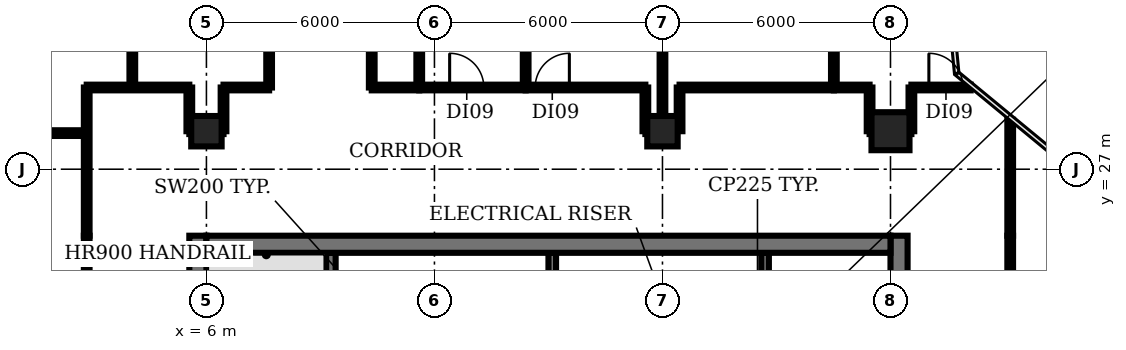
"""IFC4 building model, lengths in metres.
Left out: names, types, materials, properties, quantities, classifications, styles, units other than length and angle.
Written with IfcOpenShell. Run it as: python <this file> out.ifc"""

import sys

from ifc_helpers import new_model, si_unit, direction, frame, frame_2d, origin, origin_2d, place, context, subcontext, project, spatial, rectangle, circle, extrude, element, fill, save


model = new_model("IFC4")
c1 = context("Model", 3, precision=1e-05, world=origin(), true_north=direction((0.0, 1.0)))
c2 = subcontext(c1, "Body", "Model", "MODEL_VIEW")
j1 = project(units=[si_unit("LENGTHUNIT", "METRE"), si_unit("PLANEANGLEUNIT", "RADIAN")], contexts=[c1])
p1 = place(None, origin())
s1 = spatial("IfcSite", under=j1, at=p1, CompositionType="ELEMENT")
p2 = place(p1, origin())
s2 = spatial("IfcBuilding", under=s1, at=p2, CompositionType="ELEMENT")
p3 = place(p2, frame((0.0, 0.0, 205.4)))
s3 = spatial("IfcBuildingStorey", under=s2, at=p3, CompositionType="ELEMENT", Elevation=205.4)
for number, where, z_axis, x_axis in (
    (1, (6.0, 28.0, -0.35), (0.0, 0.0, 1.0), (1.0, 0.0, 0.0)),
    (2, (18.0, 28.0, -0.35), (0.0, 0.0, 1.0), (1.0, 0.0, 0.0)),
):
    element("IfcColumn", number, at=place(p3, frame(where, z_axis=z_axis, x_axis=x_axis)), inside=s3, PredefinedType="COLUMN", context=c2, shape_type="SweptSolid", body=[
        extrude(rectangle(XDim=0.8, YDim=0.8, at=origin_2d()), origin(), (0.0, 0.0, 1.0), 4.2),
    ])
p4 = place(p3, frame((24.0, 28.0, -0.35), z_axis=(0.0, 0.0, 1.0), x_axis=(1.0, 0.0, 0.0)))
e3 = element("IfcColumn", 3, at=p4, inside=s3, PredefinedType="COLUMN", context=c2, shape_type="SweptSolid", body=[
    extrude(circle(Radius=0.5, at=origin_2d()), origin(), (0.0, 0.0, 1.0), 4.2),
])
p5 = place(p3, frame((9.275, 18.375, 0.0), z_axis=(0.0, 0.0, 1.0), x_axis=(0.0, 1.0, 0.0)))
e4 = element("IfcWall", 4, at=p5, inside=s3, PredefinedType="SHEAR", context=c2, shape_type="SweptSolid", body=[
    extrude(rectangle(XDim=6.425, YDim=0.25, at=frame_2d((3.212, 0.0))), origin(), (0.0, 0.0, 1.0), 3.85),
])
for number, where, z_axis, x_axis in (
    (5, (15.1, 22.9, 0.0), (0.0, 0.0, 1.0), (0.0, 1.0, 0.0)),
    (6, (20.7, 22.9, 0.0), (0.0, 0.0, 1.0), (0.0, 1.0, 0.0)),
):
    element("IfcWall", number, at=place(p3, frame(where, z_axis=z_axis, x_axis=x_axis)), inside=s3, PredefinedType="SHEAR", context=c2, shape_type="SweptSolid", body=[
        extrude(rectangle(XDim=1.9, YDim=0.2, at=frame_2d((0.95, 0.0))), origin(), (0.0, 0.0, 1.0), 3.85),
    ])
p6 = place(p3, frame((5.775, 4.47, 0.0), z_axis=(0.0, 0.0, 1.0), x_axis=(0.0, 1.0, 0.0)))
e7 = element("IfcWall", 7, at=p6, inside=s3, PredefinedType="SHEAR", context=c2, shape_type="SweptSolid", body=[
    extrude(rectangle(XDim=20.78, YDim=0.45, at=frame_2d((10.39, 0.0))), origin(), (0.0, 0.0, 1.0), 3.85),
])
p7 = place(p6, frame((1.18, 0.0, 0.0)))
e8 = element("IfcOpeningElement", 8, at=p7, cuts=e7, PredefinedType="OPENING", context=c2, shape_type="SweptSolid", body=[
    extrude(rectangle(XDim=1.5, YDim=2.1, at=frame_2d((0.75, 1.05))), frame((0.0, 0.235, 0.0), z_axis=(0.0, -1.0, 0.0), x_axis=(1.0, 0.0, 0.0)), (0.0, 0.0, 1.0), 0.47),
])
p8 = place(p6, frame((7.63, 0.0, 0.0)))
e9 = element("IfcOpeningElement", 9, at=p8, cuts=e7, PredefinedType="OPENING", context=c2, shape_type="SweptSolid", body=[
    extrude(rectangle(XDim=1.2, YDim=2.1, at=frame_2d((0.6, 1.05))), frame((0.0, 0.235, 0.0), z_axis=(0.0, -1.0, 0.0), x_axis=(1.0, 0.0, 0.0)), (0.0, 0.0, 1.0), 0.47),
])
p9 = place(p6, frame((14.18, 0.0, 0.0)))
e10 = element("IfcOpeningElement", 10, at=p9, cuts=e7, PredefinedType="OPENING", context=c2, shape_type="SweptSolid", body=[
    extrude(rectangle(XDim=1.2, YDim=2.1, at=frame_2d((0.6, 1.05))), frame((0.0, 0.235, 0.0), z_axis=(0.0, -1.0, 0.0), x_axis=(1.0, 0.0, 0.0)), (0.0, 0.0, 1.0), 0.47),
])
p10 = place(p3, frame((24.225, 25.25, 0.0), z_axis=(0.0, 0.0, 1.0), x_axis=(0.0, -1.0, 0.0)))
e11 = element("IfcWall", 11, at=p10, inside=s3, PredefinedType="SHEAR", context=c2, shape_type="SweptSolid", body=[
    extrude(rectangle(XDim=20.78, YDim=0.45, at=frame_2d((10.39, 0.0))), origin(), (0.0, 0.0, 1.0), 3.85),
])
p11 = place(p10, frame((18.1, 0.0, 0.0)))
e12 = element("IfcOpeningElement", 12, at=p11, cuts=e11, PredefinedType="OPENING", context=c2, shape_type="SweptSolid", body=[
    extrude(rectangle(XDim=1.5, YDim=2.1, at=frame_2d((0.75, 1.05))), frame((0.0, 0.235, 0.0), z_axis=(0.0, -1.0, 0.0), x_axis=(1.0, 0.0, 0.0)), (0.0, 0.0, 1.0), 0.47),
])
p12 = place(p10, frame((12.0, 0.0, 0.0)))
e13 = element("IfcOpeningElement", 13, at=p12, cuts=e11, PredefinedType="OPENING", context=c2, shape_type="SweptSolid", body=[
    extrude(rectangle(XDim=0.9, YDim=2.1, at=frame_2d((0.45, 1.05))), frame((0.0, 0.235, 0.0), z_axis=(0.0, -1.0, 0.0), x_axis=(1.0, 0.0, 0.0)), (0.0, 0.0, 1.0), 0.47),
])
p13 = place(p10, frame((6.0, 0.0, 0.0)))
e14 = element("IfcOpeningElement", 14, at=p13, cuts=e11, PredefinedType="OPENING", context=c2, shape_type="SweptSolid", body=[
    extrude(rectangle(XDim=2.0, YDim=2.1, at=frame_2d((1.0, 1.05))), frame((0.0, 0.235, 0.0), z_axis=(0.0, -1.0, 0.0), x_axis=(1.0, 0.0, 0.0)), (0.0, 0.0, 1.0), 0.47),
])
p14 = place(p3, frame((6.0, 25.025, 0.0), z_axis=(0.0, 0.0, 1.0), x_axis=(1.0, 0.0, 0.0)))
e15 = element("IfcWall", 15, at=p14, inside=s3, PredefinedType="SHEAR", context=c2, shape_type="SweptSolid", body=[
    extrude(rectangle(XDim=18.0, YDim=0.45, at=frame_2d((9.0, 0.0))), origin(), (0.0, 0.0, 1.0), 3.85),
])
p15 = place(p3, frame((-0.98, 27.95, 0.0), z_axis=(0.0, 0.0, 1.0), x_axis=(1.0, 0.0, 0.0)))
e16 = element("IfcWall", 16, at=p15, inside=s3, PredefinedType="PARTITIONING", context=c2, shape_type="SweptSolid", body=[
    extrude(rectangle(XDim=3.83, YDim=0.15, at=frame_2d((1.915, 0.0))), origin(), (0.0, 0.0, 1.0), 2.88),
])
p16 = place(p3, frame((2.85, 5.77, 0.0), z_axis=(0.0, 0.0, 1.0), x_axis=(0.0, 1.0, 0.0)))
e17 = element("IfcWall", 17, at=p16, inside=s3, PredefinedType="PARTITIONING", context=c2, shape_type="SweptSolid", body=[
    extrude(rectangle(XDim=19.48, YDim=0.15, at=frame_2d((9.74, 0.0))), origin(), (0.0, 0.0, 1.0), 2.88),
])
p17 = place(p16, frame((8.48, 0.0, 0.0)))
e18 = element("IfcOpeningElement", 18, at=p17, cuts=e17, PredefinedType="OPENING", context=c2, shape_type="SweptSolid", body=[
    extrude(rectangle(XDim=1.2, YDim=2.1, at=frame_2d((0.6, 1.05))), frame((0.0, 0.085, 0.0), z_axis=(0.0, -1.0, 0.0), x_axis=(1.0, 0.0, 0.0)), (0.0, 0.0, 1.0), 0.17),
])
p18 = place(p3, frame((2.85, 25.25, 0.0), z_axis=(0.0, 0.0, 1.0), x_axis=(0.0, 1.0, 0.0)))
e19 = element("IfcWall", 19, at=p18, inside=s3, PredefinedType="PARTITIONING", context=c2, shape_type="SweptSolid", body=[
    extrude(rectangle(XDim=3.9, YDim=0.15, at=frame_2d((1.95, 0.0))), origin(), (0.0, 0.0, 1.0), 2.88),
])
p19 = place(p3, frame((2.85, 29.15, 0.0), z_axis=(0.0, 0.0, 1.0), x_axis=(1.0, 0.0, 0.0)))
e20 = element("IfcWall", 20, at=p19, inside=s3, PredefinedType="PARTITIONING", context=c2, shape_type="SweptSolid", body=[
    extrude(rectangle(XDim=2.7, YDim=0.15, at=frame_2d((1.35, 0.0))), origin(), (0.0, 0.0, 1.0), 2.88),
])
p20 = place(p3, frame((4.05, 29.15, 0.0), z_axis=(0.0, 0.0, 1.0), x_axis=(0.0, 1.0, 0.0)))
e21 = element("IfcWall", 21, at=p20, inside=s3, PredefinedType="PARTITIONING", context=c2, shape_type="SweptSolid", body=[
    extrude(rectangle(XDim=4.8, YDim=0.15, at=frame_2d((2.4, 0.0))), origin(), (0.0, 0.0, 1.0), 2.88),
])
p21 = place(p3, frame((5.55, 28.0, 0.0), z_axis=(0.0, 0.0, 1.0), x_axis=(0.0, 1.0, 0.0)))
e22 = element("IfcWall", 22, at=p21, inside=s3, PredefinedType="PARTITIONING", context=c2, shape_type="SweptSolid", body=[
    extrude(rectangle(XDim=1.15, YDim=0.15, at=frame_2d((0.575, 0.0))), origin(), (0.0, 0.0, 1.0), 2.88),
])
p22 = place(p3, frame((5.55, 28.0, 0.0), z_axis=(0.0, 0.0, 1.0), x_axis=(1.0, 0.0, 0.0)))
e23 = element("IfcWall", 23, at=p22, inside=s3, PredefinedType="PARTITIONING", context=c2, shape_type="SweptSolid", body=[
    extrude(rectangle(XDim=0.9, YDim=0.15, at=frame_2d((0.45, 0.0))), origin(), (0.0, 0.0, 1.0), 2.88),
])
p23 = place(p3, frame((6.45, 28.0, 0.0), z_axis=(0.0, 0.0, 1.0), x_axis=(0.0, 1.0, 0.0)))
e24 = element("IfcWall", 24, at=p23, inside=s3, PredefinedType="PARTITIONING", context=c2, shape_type="SweptSolid", body=[
    extrude(rectangle(XDim=1.15, YDim=0.15, at=frame_2d((0.575, 0.0))), origin(), (0.0, 0.0, 1.0), 2.88),
])
p24 = place(p3, frame((6.45, 29.15, 0.0), z_axis=(0.0, 0.0, 1.0), x_axis=(1.0, 0.0, 0.0)))
e25 = element("IfcWall", 25, at=p24, inside=s3, PredefinedType="PARTITIONING", context=c2, shape_type="SweptSolid", body=[
    extrude(rectangle(XDim=1.2, YDim=0.15, at=frame_2d((0.6, 0.0))), origin(), (0.0, 0.0, 1.0), 2.88),
])
p25 = place(p3, frame((7.65, 29.15, 0.0), z_axis=(0.0, 0.0, 1.0), x_axis=(0.0, 1.0, 0.0)))
e26 = element("IfcWall", 26, at=p25, inside=s3, PredefinedType="PARTITIONING", context=c2, shape_type="SweptSolid", body=[
    extrude(rectangle(XDim=4.8, YDim=0.15, at=frame_2d((2.4, 0.0))), origin(), (0.0, 0.0, 1.0), 2.88),
])
p26 = place(p25, frame((1.9, 0.0, 0.0)))
e27 = element("IfcOpeningElement", 27, at=p26, cuts=e26, PredefinedType="OPENING", context=c2, shape_type="SweptSolid", body=[
    extrude(rectangle(XDim=0.9, YDim=2.1, at=frame_2d((0.45, 1.05))), frame((0.0, 0.085, 0.0), z_axis=(0.0, -1.0, 0.0), x_axis=(1.0, 0.0, 0.0)), (0.0, 0.0, 1.0), 0.17),
])
p27 = place(p3, frame((10.35, 29.15, 0.0), z_axis=(0.0, 0.0, 1.0), x_axis=(0.0, 1.0, 0.0)))
e28 = element("IfcWall", 28, at=p27, inside=s3, PredefinedType="PARTITIONING", context=c2, shape_type="SweptSolid", body=[
    extrude(rectangle(XDim=4.8, YDim=0.15, at=frame_2d((2.4, 0.0))), origin(), (0.0, 0.0, 1.0), 2.88),
])
p28 = place(p3, frame((10.35, 29.15, 0.0), z_axis=(0.0, 0.0, 1.0), x_axis=(1.0, 0.0, 0.0)))
e29 = element("IfcWall", 29, at=p28, inside=s3, PredefinedType="PARTITIONING", context=c2, shape_type="SweptSolid", body=[
    extrude(rectangle(XDim=1.25, YDim=0.15, at=frame_2d((0.625, 0.0))), origin(), (0.0, 0.0, 1.0), 2.88),
])
p29 = place(p3, frame((11.6, 29.15, 0.0), z_axis=(0.0, 0.0, 1.0), x_axis=(0.0, 1.0, 0.0)))
e30 = element("IfcWall", 30, at=p29, inside=s3, PredefinedType="PARTITIONING", context=c2, shape_type="SweptSolid", body=[
    extrude(rectangle(XDim=4.6, YDim=0.15, at=frame_2d((2.3, 0.0))), origin(), (0.0, 0.0, 1.0), 2.88),
])
p30 = place(p3, frame((11.6, 29.15, 0.0), z_axis=(0.0, 0.0, 1.0), x_axis=(1.0, 0.0, 0.0)))
e31 = element("IfcWall", 31, at=p30, inside=s3, PredefinedType="PARTITIONING", context=c2, shape_type="SweptSolid", body=[
    extrude(rectangle(XDim=2.8, YDim=0.15, at=frame_2d((1.4, 0.0))), origin(), (0.0, 0.0, 1.0), 2.88),
])
p31 = place(p30, frame((0.8, 0.0, 0.0)))
e32 = element("IfcOpeningElement", 32, at=p31, cuts=e31, PredefinedType="OPENING", context=c2, shape_type="SweptSolid", body=[
    extrude(rectangle(XDim=0.9, YDim=2.1, at=frame_2d((0.45, 1.05))), frame((0.0, 0.085, 0.0), z_axis=(0.0, -1.0, 0.0), x_axis=(1.0, 0.0, 0.0)), (0.0, 0.0, 1.0), 0.17),
])
p32 = place(p3, frame((14.4, 29.15, 0.0), z_axis=(0.0, 0.0, 1.0), x_axis=(0.0, 1.0, 0.0)))
e33 = element("IfcWall", 33, at=p32, inside=s3, PredefinedType="PARTITIONING", context=c2, shape_type="SweptSolid", body=[
    extrude(rectangle(XDim=4.8, YDim=0.15, at=frame_2d((2.4, 0.0))), origin(), (0.0, 0.0, 1.0), 2.88),
])
p33 = place(p3, frame((14.4, 29.15, 0.0), z_axis=(0.0, 0.0, 1.0), x_axis=(1.0, 0.0, 0.0)))
e34 = element("IfcWall", 34, at=p33, inside=s3, PredefinedType="PARTITIONING", context=c2, shape_type="SweptSolid", body=[
    extrude(rectangle(XDim=3.15, YDim=0.15, at=frame_2d((1.575, 0.0))), origin(), (0.0, 0.0, 1.0), 2.88),
])
p34 = place(p33, frame((0.25, 0.0, 0.0)))
e35 = element("IfcOpeningElement", 35, at=p34, cuts=e34, PredefinedType="OPENING", context=c2, shape_type="SweptSolid", body=[
    extrude(rectangle(XDim=0.9, YDim=2.1, at=frame_2d((0.45, 1.05))), frame((0.0, 0.085, 0.0), z_axis=(0.0, -1.0, 0.0), x_axis=(1.0, 0.0, 0.0)), (0.0, 0.0, 1.0), 0.17),
])
p35 = place(p3, frame((17.55, 28.0, 0.0), z_axis=(0.0, 0.0, 1.0), x_axis=(0.0, 1.0, 0.0)))
e36 = element("IfcWall", 36, at=p35, inside=s3, PredefinedType="PARTITIONING", context=c2, shape_type="SweptSolid", body=[
    extrude(rectangle(XDim=1.15, YDim=0.15, at=frame_2d((0.575, 0.0))), origin(), (0.0, 0.0, 1.0), 2.88),
])
p36 = place(p3, frame((17.55, 28.0, 0.0), z_axis=(0.0, 0.0, 1.0), x_axis=(1.0, 0.0, 0.0)))
e37 = element("IfcWall", 37, at=p36, inside=s3, PredefinedType="PARTITIONING", context=c2, shape_type="SweptSolid", body=[
    extrude(rectangle(XDim=0.45, YDim=0.15, at=frame_2d((0.225, 0.0))), origin(), (0.0, 0.0, 1.0), 2.88),
])
p37 = place(p3, frame((18.0, 28.0, 0.0), z_axis=(0.0, 0.0, 1.0), x_axis=(0.0, 1.0, 0.0)))
e38 = element("IfcWall", 38, at=p37, inside=s3, PredefinedType="PARTITIONING", context=c2, shape_type="SweptSolid", body=[
    extrude(rectangle(XDim=5.95, YDim=0.15, at=frame_2d((2.975, 0.0))), origin(), (0.0, 0.0, 1.0), 2.88),
])
p38 = place(p3, frame((18.45, 28.0, 0.0), z_axis=(0.0, 0.0, 1.0), x_axis=(0.0, 1.0, 0.0)))
e39 = element("IfcWall", 39, at=p38, inside=s3, PredefinedType="PARTITIONING", context=c2, shape_type="SweptSolid", body=[
    extrude(rectangle(XDim=1.15, YDim=0.15, at=frame_2d((0.575, 0.0))), origin(), (0.0, 0.0, 1.0), 2.88),
])
p39 = place(p3, frame((18.45, 29.15, 0.0), z_axis=(0.0, 0.0, 1.0), x_axis=(1.0, 0.0, 0.0)))
e40 = element("IfcWall", 40, at=p39, inside=s3, PredefinedType="PARTITIONING", context=c2, shape_type="SweptSolid", body=[
    extrude(rectangle(XDim=4.06, YDim=0.15, at=frame_2d((2.03, 0.0))), origin(), (0.0, 0.0, 1.0), 2.88),
])
p40 = place(p3, frame((22.51, 29.15, 0.0), z_axis=(0.0, 0.0, 1.0), x_axis=(0.0, 1.0, 0.0)))
e41 = element("IfcWall", 41, at=p40, inside=s3, PredefinedType="PARTITIONING", context=c2, shape_type="SweptSolid", body=[
    extrude(rectangle(XDim=4.8, YDim=0.15, at=frame_2d((2.4, 0.0))), origin(), (0.0, 0.0, 1.0), 2.88),
])
p41 = place(p3, frame((22.51, 29.15, 0.0), z_axis=(0.0, 0.0, 1.0), x_axis=(1.0, 0.0, 0.0)))
e42 = element("IfcWall", 42, at=p41, inside=s3, PredefinedType="PARTITIONING", context=c2, shape_type="SweptSolid", body=[
    extrude(rectangle(XDim=0.94, YDim=0.15, at=frame_2d((0.47, 0.0))), origin(), (0.0, 0.0, 1.0), 2.88),
])
p42 = place(p3, frame((23.45, 28.0, 0.0), z_axis=(0.0, 0.0, 1.0), x_axis=(0.0, 1.0, 0.0)))
e43 = element("IfcWall", 43, at=p42, inside=s3, PredefinedType="PARTITIONING", context=c2, shape_type="SweptSolid", body=[
    extrude(rectangle(XDim=1.15, YDim=0.15, at=frame_2d((0.575, 0.0))), origin(), (0.0, 0.0, 1.0), 2.88),
])
p43 = place(p3, frame((23.45, 28.0, 0.0), z_axis=(0.0, 0.0, 1.0), x_axis=(1.0, 0.0, 0.0)))
e44 = element("IfcWall", 44, at=p43, inside=s3, PredefinedType="PARTITIONING", context=c2, shape_type="SweptSolid", body=[
    extrude(rectangle(XDim=1.1, YDim=0.15, at=frame_2d((0.55, 0.0))), origin(), (0.0, 0.0, 1.0), 2.88),
])
p44 = place(p3, frame((24.55, 28.0, 0.0), z_axis=(0.0, 0.0, 1.0), x_axis=(0.0, 1.0, 0.0)))
e45 = element("IfcWall", 45, at=p44, inside=s3, PredefinedType="PARTITIONING", context=c2, shape_type="SweptSolid", body=[
    extrude(rectangle(XDim=1.15, YDim=0.15, at=frame_2d((0.575, 0.0))), origin(), (0.0, 0.0, 1.0), 2.88),
])
p45 = place(p3, frame((24.55, 29.15, 0.0), z_axis=(0.0, 0.0, 1.0), x_axis=(1.0, 0.0, 0.0)))
e46 = element("IfcWall", 46, at=p45, inside=s3, PredefinedType="PARTITIONING", context=c2, shape_type="SweptSolid", body=[
    extrude(rectangle(XDim=1.56, YDim=0.15, at=frame_2d((0.78, 0.0))), origin(), (0.0, 0.0, 1.0), 2.88),
])
p46 = place(p45, frame((0.46, 0.0, 0.0)))
e47 = element("IfcOpeningElement", 47, at=p46, cuts=e46, PredefinedType="OPENING", context=c2, shape_type="SweptSolid", body=[
    extrude(rectangle(XDim=0.9, YDim=2.1, at=frame_2d((0.45, 1.05))), frame((0.0, 0.085, 0.0), z_axis=(0.0, -1.0, 0.0), x_axis=(1.0, 0.0, 0.0)), (0.0, 0.0, 1.0), 0.17),
])
p47 = place(p3, frame((27.15, 25.25, 0.0), z_axis=(0.0, 0.0, 1.0), x_axis=(0.0, -1.0, 0.0)))
e48 = element("IfcWall", 48, at=p47, inside=s3, PredefinedType="PARTITIONING", context=c2, shape_type="SweptSolid", body=[
    extrude(rectangle(XDim=10.1, YDim=0.15, at=frame_2d((5.05, 0.0))), origin(), (0.0, 0.0, 1.0), 2.88),
])
p48 = place(p47, frame((4.5, 0.0, 0.0)))
e49 = element("IfcOpeningElement", 49, at=p48, cuts=e48, PredefinedType="OPENING", context=c2, shape_type="SweptSolid", body=[
    extrude(rectangle(XDim=1.2, YDim=2.1, at=frame_2d((0.6, 1.05))), frame((0.0, 0.085, 0.0), z_axis=(0.0, -1.0, 0.0), x_axis=(1.0, 0.0, 0.0)), (0.0, 0.0, 1.0), 0.17),
])
p49 = place(p3, frame((27.15, 25.25, 0.0), z_axis=(0.0, 0.0, 1.0), x_axis=(0.0, 1.0, 0.0)))
e50 = element("IfcWall", 50, at=p49, inside=s3, PredefinedType="PARTITIONING", context=c2, shape_type="SweptSolid", body=[
    extrude(rectangle(XDim=3.05, YDim=0.15, at=frame_2d((1.525, 0.0))), origin(), (0.0, 0.0, 1.0), 2.88),
])
p50 = place(p31, origin())
e51 = element("IfcDoor", 51, at=p50, inside=s3, OperationType="SINGLE_SWING_LEFT", PredefinedType="DOOR", context=c2, shape_type="SweptSolid", body=[
    extrude(rectangle(XDim=0.9, YDim=2.1, at=frame_2d((0.45, 1.05))), frame((0.0, 0.025, 0.0), z_axis=(0.0, -1.0, 0.0), x_axis=(1.0, 0.0, 0.0)), (0.0, 0.0, 1.0), 0.05),
])
fill(e32, e51)
p51 = place(p34, origin())
e52 = element("IfcDoor", 52, at=p51, inside=s3, OperationType="SINGLE_SWING_RIGHT", PredefinedType="DOOR", context=c2, shape_type="SweptSolid", body=[
    extrude(rectangle(XDim=0.9, YDim=2.1, at=frame_2d((0.45, 1.05))), frame((0.0, 0.025, 0.0), z_axis=(0.0, -1.0, 0.0), x_axis=(1.0, 0.0, 0.0)), (0.0, 0.0, 1.0), 0.05),
])
fill(e35, e52)
p52 = place(p46, origin())
e53 = element("IfcDoor", 53, at=p52, inside=s3, OperationType="SINGLE_SWING_LEFT", PredefinedType="DOOR", context=c2, shape_type="SweptSolid", body=[
    extrude(rectangle(XDim=0.9, YDim=2.1, at=frame_2d((0.45, 1.05))), frame((0.0, 0.025, 0.0), z_axis=(0.0, -1.0, 0.0), x_axis=(1.0, 0.0, 0.0)), (0.0, 0.0, 1.0), 0.05),
])
fill(e47, e53)
save(model, sys.argv[1])
